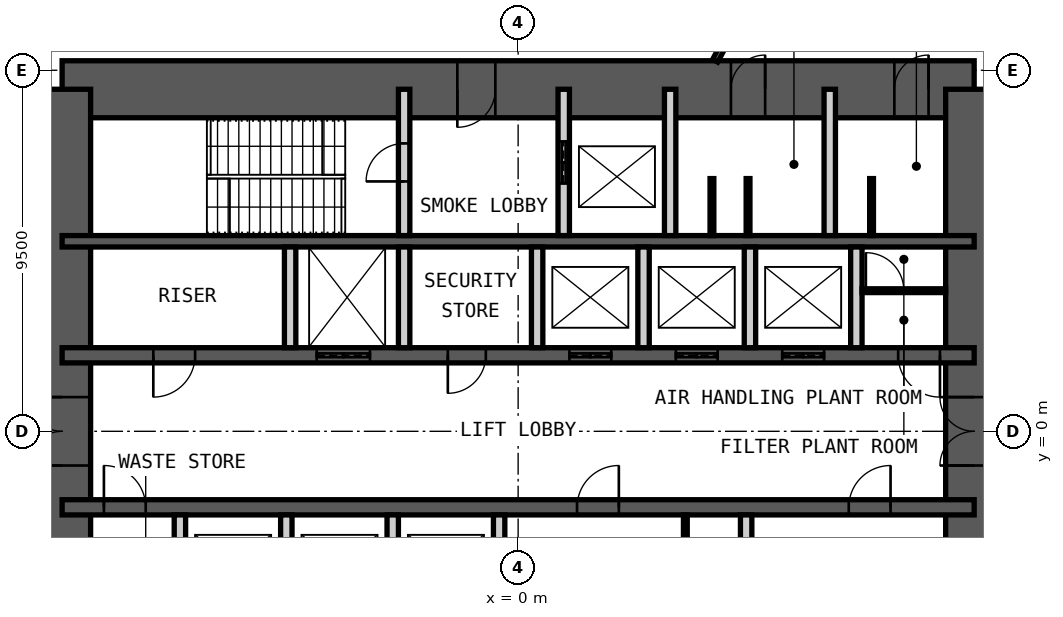
"""IFC4 building model, lengths in metres.
Left out: names, types, materials, properties, quantities, classifications, styles, units other than length and angle.
Written with IfcOpenShell. Run it as: python <this file> out.ifc"""

import sys

from ifc_helpers import new_model, si_unit, direction, frame, frame_2d, origin, place, context, subcontext, project, spatial, rectangle, extrude, element, fill, save


model = new_model("IFC4")
c1 = context("Model", 3, precision=1e-05, world=origin(), true_north=direction((0.0, 1.0)))
c2 = subcontext(c1, "Body", "Model", "MODEL_VIEW")
j1 = project(units=[si_unit("LENGTHUNIT", "METRE"), si_unit("PLANEANGLEUNIT", "RADIAN")], contexts=[c1])
p1 = place(None, origin())
s1 = spatial("IfcSite", under=j1, at=p1, CompositionType="ELEMENT")
p2 = place(p1, origin())
s2 = spatial("IfcBuilding", under=s1, at=p2, CompositionType="ELEMENT")
p3 = place(p2, frame((0.0, 0.0, 12.0)))
s3 = spatial("IfcBuildingStorey", under=s2, at=p3, CompositionType="ELEMENT", Elevation=12.0)
p4 = place(p3, frame((-12.0, 9.0, 0.0), z_axis=(0.0, 0.0, 1.0), x_axis=(1.0, 0.0, 0.0)))
e1 = element("IfcWall", 1, at=p4, inside=s3, PredefinedType="SHEAR", context=c2, shape_type="SweptSolid", body=[
    extrude(rectangle(XDim=24.0, YDim=1.5, at=frame_2d((12.0, 0.0))), origin(), (0.0, 0.0, 1.0), 5.0),
])
p5 = place(p4, frame((10.4, 0.0, 0.0)))
e2 = element("IfcOpeningElement", 2, at=p5, cuts=e1, PredefinedType="OPENING", context=c2, shape_type="SweptSolid", body=[
    extrude(rectangle(XDim=1.0, YDim=2.1, at=frame_2d((0.5, 1.05))), frame((0.0, 0.76, 0.0), z_axis=(0.0, -1.0, 0.0), x_axis=(1.0, 0.0, 0.0)), (0.0, 0.0, 1.0), 1.52),
])
p6 = place(p4, frame((17.6, 0.0, 0.0)))
e3 = element("IfcOpeningElement", 3, at=p6, cuts=e1, PredefinedType="OPENING", context=c2, shape_type="SweptSolid", body=[
    extrude(rectangle(XDim=0.9, YDim=2.1, at=frame_2d((0.45, 1.05))), frame((0.0, 0.76, 0.0), z_axis=(0.0, -1.0, 0.0), x_axis=(1.0, 0.0, 0.0)), (0.0, 0.0, 1.0), 1.52),
])
p7 = place(p4, frame((21.9, 0.0, 0.0)))
e4 = element("IfcOpeningElement", 4, at=p7, cuts=e1, PredefinedType="OPENING", context=c2, shape_type="SweptSolid", body=[
    extrude(rectangle(XDim=0.9, YDim=2.1, at=frame_2d((0.45, 1.05))), frame((0.0, 0.76, 0.0), z_axis=(0.0, -1.0, 0.0), x_axis=(1.0, 0.0, 0.0)), (0.0, 0.0, 1.0), 1.52),
])
p8 = place(p3, frame((12.0, -9.0, 0.0), z_axis=(0.0, 0.0, 1.0), x_axis=(0.0, 1.0, 0.0)))
e5 = element("IfcWall", 5, at=p8, inside=s3, PredefinedType="SHEAR", context=c2, shape_type="SweptSolid", body=[
    extrude(rectangle(XDim=18.0, YDim=1.5, at=frame_2d((9.0, 0.0))), origin(), (0.0, 0.0, 1.0), 5.0),
])
p9 = place(p8, frame((8.1, 0.0, 0.0)))
e6 = element("IfcOpeningElement", 6, at=p9, cuts=e5, PredefinedType="OPENING", context=c2, shape_type="SweptSolid", body=[
    extrude(rectangle(XDim=1.8, YDim=2.1, at=frame_2d((0.9, 1.05))), frame((0.0, 0.76, 0.0), z_axis=(0.0, -1.0, 0.0), x_axis=(1.0, 0.0, 0.0)), (0.0, 0.0, 1.0), 1.52),
])
p10 = place(p3, frame((-12.0, -9.0, 0.0), z_axis=(0.0, 0.0, 1.0), x_axis=(0.0, 1.0, 0.0)))
e7 = element("IfcWall", 7, at=p10, inside=s3, PredefinedType="SHEAR", context=c2, shape_type="SweptSolid", body=[
    extrude(rectangle(XDim=18.0, YDim=1.5, at=frame_2d((9.0, 0.0))), origin(), (0.0, 0.0, 1.0), 5.0),
])
p11 = place(p10, frame((8.1, 0.0, 0.0)))
e8 = element("IfcOpeningElement", 8, at=p11, cuts=e7, PredefinedType="OPENING", context=c2, shape_type="SweptSolid", body=[
    extrude(rectangle(XDim=1.8, YDim=2.1, at=frame_2d((0.9, 1.05))), frame((0.0, 0.76, 0.0), z_axis=(0.0, -1.0, 0.0), x_axis=(1.0, 0.0, 0.0)), (0.0, 0.0, 1.0), 1.52),
])
p12 = place(p3, frame((-12.0, 5.0, 0.0), z_axis=(0.0, 0.0, 1.0), x_axis=(1.0, 0.0, 0.0)))
e9 = element("IfcWall", 9, at=p12, inside=s3, PredefinedType="SHEAR", context=c2, shape_type="SweptSolid", body=[
    extrude(rectangle(XDim=24.0, YDim=0.3, at=frame_2d((12.0, 0.0))), origin(), (0.0, 0.0, 1.0), 5.0),
])
p13 = place(p3, frame((-12.0, 2.0, 0.0), z_axis=(0.0, 0.0, 1.0), x_axis=(1.0, 0.0, 0.0)))
e10 = element("IfcWall", 10, at=p13, inside=s3, PredefinedType="SHEAR", context=c2, shape_type="SweptSolid", body=[
    extrude(rectangle(XDim=24.0, YDim=0.4, at=frame_2d((12.0, 0.0))), origin(), (0.0, 0.0, 1.0), 5.0),
])
p14 = place(p13, frame((2.4, 0.0, 0.0)))
e11 = element("IfcOpeningElement", 11, at=p14, cuts=e10, PredefinedType="OPENING", context=c2, shape_type="SweptSolid", body=[
    extrude(rectangle(XDim=1.1, YDim=2.1, at=frame_2d((0.55, 1.05))), frame((0.0, 0.21, 0.0), z_axis=(0.0, -1.0, 0.0), x_axis=(1.0, 0.0, 0.0)), (0.0, 0.0, 1.0), 0.42),
])
p15 = place(p13, frame((22.0, 0.0, 0.0)))
e12 = element("IfcOpeningElement", 12, at=p15, cuts=e10, PredefinedType="OPENING", context=c2, shape_type="SweptSolid", body=[
    extrude(rectangle(XDim=1.1, YDim=2.1, at=frame_2d((0.55, 1.05))), frame((0.0, 0.21, 0.0), z_axis=(0.0, -1.0, 0.0), x_axis=(1.0, 0.0, 0.0)), (0.0, 0.0, 1.0), 0.42),
])
p16 = place(p13, frame((10.15, 0.0, 0.0)))
e13 = element("IfcOpeningElement", 13, at=p16, cuts=e10, PredefinedType="OPENING", context=c2, shape_type="SweptSolid", body=[
    extrude(rectangle(XDim=1.0, YDim=2.1, at=frame_2d((0.5, 1.05))), frame((0.0, 0.21, 0.0), z_axis=(0.0, -1.0, 0.0), x_axis=(1.0, 0.0, 0.0)), (0.0, 0.0, 1.0), 0.42),
])
p17 = place(p13, frame((6.7, 0.0, 0.0)))
e14 = element("IfcOpeningElement", 14, at=p17, cuts=e10, PredefinedType="OPENING", context=c2, shape_type="SweptSolid", body=[
    extrude(rectangle(XDim=1.4, YDim=2.4, at=frame_2d((0.7, 1.2))), frame((0.0, 0.21, 0.0), z_axis=(0.0, -1.0, 0.0), x_axis=(1.0, 0.0, 0.0)), (0.0, 0.0, 1.0), 0.42),
])
p18 = place(p13, frame((13.35, 0.0, 0.0)))
e15 = element("IfcOpeningElement", 15, at=p18, cuts=e10, PredefinedType="OPENING", context=c2, shape_type="SweptSolid", body=[
    extrude(rectangle(XDim=1.1, YDim=2.4, at=frame_2d((0.55, 1.2))), frame((0.0, 0.21, 0.0), z_axis=(0.0, -1.0, 0.0), x_axis=(1.0, 0.0, 0.0)), (0.0, 0.0, 1.0), 0.42),
])
p19 = place(p13, frame((16.15, 0.0, 0.0)))
e16 = element("IfcOpeningElement", 16, at=p19, cuts=e10, PredefinedType="OPENING", context=c2, shape_type="SweptSolid", body=[
    extrude(rectangle(XDim=1.1, YDim=2.4, at=frame_2d((0.55, 1.2))), frame((0.0, 0.21, 0.0), z_axis=(0.0, -1.0, 0.0), x_axis=(1.0, 0.0, 0.0)), (0.0, 0.0, 1.0), 0.42),
])
p20 = place(p13, frame((18.95, 0.0, 0.0)))
e17 = element("IfcOpeningElement", 17, at=p20, cuts=e10, PredefinedType="OPENING", context=c2, shape_type="SweptSolid", body=[
    extrude(rectangle(XDim=1.1, YDim=2.4, at=frame_2d((0.55, 1.2))), frame((0.0, 0.21, 0.0), z_axis=(0.0, -1.0, 0.0), x_axis=(1.0, 0.0, 0.0)), (0.0, 0.0, 1.0), 0.42),
])
p21 = place(p3, frame((-12.0, -2.0, 0.0), z_axis=(0.0, 0.0, 1.0), x_axis=(1.0, 0.0, 0.0)))
e18 = element("IfcWall", 18, at=p21, inside=s3, PredefinedType="SHEAR", context=c2, shape_type="SweptSolid", body=[
    extrude(rectangle(XDim=24.0, YDim=0.4, at=frame_2d((12.0, 0.0))), origin(), (0.0, 0.0, 1.0), 5.0),
])
p22 = place(p21, frame((1.1, 0.0, 0.0)))
e19 = element("IfcOpeningElement", 19, at=p22, cuts=e18, PredefinedType="OPENING", context=c2, shape_type="SweptSolid", body=[
    extrude(rectangle(XDim=1.1, YDim=2.1, at=frame_2d((0.55, 1.05))), frame((0.0, 0.21, 0.0), z_axis=(0.0, -1.0, 0.0), x_axis=(1.0, 0.0, 0.0)), (0.0, 0.0, 1.0), 0.42),
])
p23 = place(p21, frame((13.55, 0.0, 0.0)))
e20 = element("IfcOpeningElement", 20, at=p23, cuts=e18, PredefinedType="OPENING", context=c2, shape_type="SweptSolid", body=[
    extrude(rectangle(XDim=1.1, YDim=2.1, at=frame_2d((0.55, 1.05))), frame((0.0, 0.21, 0.0), z_axis=(0.0, -1.0, 0.0), x_axis=(1.0, 0.0, 0.0)), (0.0, 0.0, 1.0), 0.42),
])
p24 = place(p21, frame((20.7, 0.0, 0.0)))
e21 = element("IfcOpeningElement", 21, at=p24, cuts=e18, PredefinedType="OPENING", context=c2, shape_type="SweptSolid", body=[
    extrude(rectangle(XDim=1.1, YDim=2.1, at=frame_2d((0.55, 1.05))), frame((0.0, 0.21, 0.0), z_axis=(0.0, -1.0, 0.0), x_axis=(1.0, 0.0, 0.0)), (0.0, 0.0, 1.0), 0.42),
])
p25 = place(p3, frame((-3.0, 5.15, 0.0), z_axis=(0.0, 0.0, 1.0), x_axis=(0.0, 1.0, 0.0)))
e22 = element("IfcWall", 22, at=p25, inside=s3, PredefinedType="PARTITIONING", context=c2, shape_type="SweptSolid", body=[
    extrude(rectangle(XDim=3.85, YDim=0.3, at=frame_2d((1.925, 0.0))), origin(), (0.0, 0.0, 1.0), 4.78),
])
p26 = place(p25, frame((1.425, 0.0, 0.0)))
e23 = element("IfcOpeningElement", 23, at=p26, cuts=e22, PredefinedType="OPENING", context=c2, shape_type="SweptSolid", body=[
    extrude(rectangle(XDim=1.0, YDim=2.1, at=frame_2d((0.5, 1.05))), frame((0.0, 0.16, 0.0), z_axis=(0.0, -1.0, 0.0), x_axis=(1.0, 0.0, 0.0)), (0.0, 0.0, 1.0), 0.32),
])
p27 = place(p3, frame((1.2, 5.15, 0.0), z_axis=(0.0, 0.0, 1.0), x_axis=(0.0, 1.0, 0.0)))
e24 = element("IfcWall", 24, at=p27, inside=s3, PredefinedType="PARTITIONING", context=c2, shape_type="SweptSolid", body=[
    extrude(rectangle(XDim=3.85, YDim=0.3, at=frame_2d((1.925, 0.0))), origin(), (0.0, 0.0, 1.0), 4.78),
])
p28 = place(p27, frame((1.375, 0.0, 0.0)))
e25 = element("IfcOpeningElement", 25, at=p28, cuts=e24, PredefinedType="OPENING", context=c2, shape_type="SweptSolid", body=[
    extrude(rectangle(XDim=1.1, YDim=2.4, at=frame_2d((0.55, 1.2))), frame((0.0, 0.16, 0.0), z_axis=(0.0, -1.0, 0.0), x_axis=(1.0, 0.0, 0.0)), (0.0, 0.0, 1.0), 0.32),
])
for number, where, z_axis, x_axis in (
    (26, (4.0, 5.15, 0.0), (0.0, 0.0, 1.0), (0.0, 1.0, 0.0)),
    (27, (8.2, 5.15, 0.0), (0.0, 0.0, 1.0), (0.0, 1.0, 0.0)),
):
    element("IfcWall", number, at=place(p3, frame(where, z_axis=z_axis, x_axis=x_axis)), inside=s3, PredefinedType="PARTITIONING", context=c2, shape_type="SweptSolid", body=[
        extrude(rectangle(XDim=3.85, YDim=0.3, at=frame_2d((1.925, 0.0))), origin(), (0.0, 0.0, 1.0), 4.78),
    ])
for number, where, z_axis, x_axis in (
    (28, (-6.0, 2.2, 0.0), (0.0, 0.0, 1.0), (0.0, 1.0, 0.0)),
    (29, (-3.0, 2.2, 0.0), (0.0, 0.0, 1.0), (0.0, 1.0, 0.0)),
    (30, (0.5, 2.2, 0.0), (0.0, 0.0, 1.0), (0.0, 1.0, 0.0)),
    (31, (3.3, 2.2, 0.0), (0.0, 0.0, 1.0), (0.0, 1.0, 0.0)),
    (32, (6.1, 2.2, 0.0), (0.0, 0.0, 1.0), (0.0, 1.0, 0.0)),
    (33, (8.9, 2.2, 0.0), (0.0, 0.0, 1.0), (0.0, 1.0, 0.0)),
    (34, (-8.9, -4.85, 0.0), (0.0, 0.0, 1.0), (0.0, 1.0, 0.0)),
    (35, (-6.1, -4.85, 0.0), (0.0, 0.0, 1.0), (0.0, 1.0, 0.0)),
    (36, (-3.3, -4.85, 0.0), (0.0, 0.0, 1.0), (0.0, 1.0, 0.0)),
    (37, (-0.5, -4.85, 0.0), (0.0, 0.0, 1.0), (0.0, 1.0, 0.0)),
    (38, (6.0, -4.85, 0.0), (0.0, 0.0, 1.0), (0.0, 1.0, 0.0)),
):
    element("IfcWall", number, at=place(p3, frame(where, z_axis=z_axis, x_axis=x_axis)), inside=s3, PredefinedType="PARTITIONING", context=c2, shape_type="SweptSolid", body=[
        extrude(rectangle(XDim=2.65, YDim=0.3, at=frame_2d((1.325, 0.0))), origin(), (0.0, 0.0, 1.0), 4.78),
    ])
p29 = place(p3, frame((4.4, -4.85, 0.0), z_axis=(0.0, 0.0, 1.0), x_axis=(0.0, 1.0, 0.0)))
e39 = element("IfcWall", 39, at=p29, inside=s3, PredefinedType="PARTITIONING", context=c2, shape_type="SweptSolid", body=[
    extrude(rectangle(XDim=2.65, YDim=0.1, at=frame_2d((1.325, 0.0))), origin(), (0.0, 0.0, 1.0), 4.78),
])
p30 = place(p29, frame((0.1, 0.0, 0.0)))
e40 = element("IfcOpeningElement", 40, at=p30, cuts=e39, PredefinedType="OPENING", context=c2, shape_type="SweptSolid", body=[
    extrude(rectangle(XDim=1.0, YDim=2.4, at=frame_2d((0.5, 1.2))), frame((0.0, 0.06, 0.0), z_axis=(0.0, -1.0, 0.0), x_axis=(1.0, 0.0, 0.0)), (0.0, 0.0, 1.0), 0.12),
])
p31 = place(p3, frame((9.05, 3.7, 0.0), z_axis=(0.0, 0.0, 1.0), x_axis=(1.0, 0.0, 0.0)))
e41 = element("IfcWall", 41, at=p31, inside=s3, PredefinedType="PARTITIONING", context=c2, shape_type="SweptSolid", body=[
    extrude(rectangle(XDim=2.2, YDim=0.1, at=frame_2d((1.1, 0.0))), origin(), (0.0, 0.0, 1.0), 4.78),
])
p32 = place(p31, frame((0.1, 0.0, 0.0)))
e42 = element("IfcOpeningElement", 42, at=p32, cuts=e41, PredefinedType="OPENING", context=c2, shape_type="SweptSolid", body=[
    extrude(rectangle(XDim=1.0, YDim=2.4, at=frame_2d((0.5, 1.2))), frame((0.0, 0.06, 0.0), z_axis=(0.0, -1.0, 0.0), x_axis=(1.0, 0.0, 0.0)), (0.0, 0.0, 1.0), 0.12),
])
for number, where, z_axis, x_axis in (
    (43, (5.1, 5.15, 0.0), (0.0, 0.0, 1.0), (0.0, 1.0, 0.0)),
    (44, (6.05, 5.15, 0.0), (0.0, 0.0, 1.0), (0.0, 1.0, 0.0)),
    (45, (9.3, 5.15, 0.0), (0.0, 0.0, 1.0), (0.0, 1.0, 0.0)),
):
    element("IfcWall", number, at=place(p3, frame(where, z_axis=z_axis, x_axis=x_axis)), inside=s3, PredefinedType="PARTITIONING", context=c2, shape_type="SweptSolid", body=[
        extrude(rectangle(XDim=1.5, YDim=0.1, at=frame_2d((0.75, 0.0))), origin(), (0.0, 0.0, 1.0), 2.1),
    ])
p33 = place(p3, frame((5.184, 9.75, 0.0), z_axis=(0.0, 0.0, 1.0), x_axis=(0.469474147629, 0.882946218469, 0.0)))
e46 = element("IfcWall", 46, at=p33, inside=s3, PredefinedType="PARTITIONING", context=c2, shape_type="SweptSolid", body=[
    extrude(rectangle(XDim=24.588, YDim=0.15, at=frame_2d((12.294, 0.0))), origin(), (0.0, 0.0, 1.0), 4.7),
])
p34 = place(p33, frame((11.394, 0.0, 0.0)))
e47 = element("IfcOpeningElement", 47, at=p34, cuts=e46, PredefinedType="OPENING", context=c2, shape_type="SweptSolid", body=[
    extrude(rectangle(XDim=1.8, YDim=2.4, at=frame_2d((0.9, 1.2))), frame((0.0, 0.085, 0.0), z_axis=(0.0, -1.0, 0.0), x_axis=(1.0, 0.0, 0.0)), (0.0, 0.0, 1.0), 0.17),
])
p35 = place(p5, origin())
e48 = element("IfcDoor", 48, at=p35, inside=s3, OperationType="SINGLE_SWING_LEFT", PredefinedType="DOOR", context=c2, shape_type="SweptSolid", body=[
    extrude(rectangle(XDim=1.0, YDim=2.1, at=frame_2d((0.5, 1.05))), frame((0.0, 0.025, 0.0), z_axis=(0.0, -1.0, 0.0), x_axis=(1.0, 0.0, 0.0)), (0.0, 0.0, 1.0), 0.05),
])
fill(e2, e48)
p36 = place(p6, origin())
e49 = element("IfcDoor", 49, at=p36, inside=s3, OperationType="SINGLE_SWING_LEFT", PredefinedType="DOOR", context=c2, shape_type="SweptSolid", body=[
    extrude(rectangle(XDim=0.9, YDim=2.1, at=frame_2d((0.45, 1.05))), frame((0.0, 0.025, 0.0), z_axis=(0.0, -1.0, 0.0), x_axis=(1.0, 0.0, 0.0)), (0.0, 0.0, 1.0), 0.05),
])
fill(e3, e49)
p37 = place(p7, origin())
e50 = element("IfcDoor", 50, at=p37, inside=s3, OperationType="SINGLE_SWING_LEFT", PredefinedType="DOOR", context=c2, shape_type="SweptSolid", body=[
    extrude(rectangle(XDim=0.9, YDim=2.1, at=frame_2d((0.45, 1.05))), frame((0.0, 0.025, 0.0), z_axis=(0.0, -1.0, 0.0), x_axis=(1.0, 0.0, 0.0)), (0.0, 0.0, 1.0), 0.05),
])
fill(e4, e50)
p38 = place(p26, origin())
e51 = element("IfcDoor", 51, at=p38, inside=s3, OperationType="SINGLE_SWING_RIGHT", PredefinedType="DOOR", context=c2, shape_type="SweptSolid", body=[
    extrude(rectangle(XDim=1.0, YDim=2.1, at=frame_2d((0.5, 1.05))), frame((0.0, 0.025, 0.0), z_axis=(0.0, -1.0, 0.0), x_axis=(1.0, 0.0, 0.0)), (0.0, 0.0, 1.0), 0.05),
])
fill(e23, e51)
p39 = place(p14, origin())
e52 = element("IfcDoor", 52, at=p39, inside=s3, OperationType="SINGLE_SWING_LEFT", PredefinedType="DOOR", context=c2, shape_type="SweptSolid", body=[
    extrude(rectangle(XDim=1.1, YDim=2.1, at=frame_2d((0.55, 1.05))), frame((0.0, 0.025, 0.0), z_axis=(0.0, -1.0, 0.0), x_axis=(1.0, 0.0, 0.0)), (0.0, 0.0, 1.0), 0.05),
])
fill(e11, e52)
p40 = place(p22, origin())
e53 = element("IfcDoor", 53, at=p40, inside=s3, OperationType="SINGLE_SWING_RIGHT", PredefinedType="DOOR", context=c2, shape_type="SweptSolid", body=[
    extrude(rectangle(XDim=1.1, YDim=2.1, at=frame_2d((0.55, 1.05))), frame((0.0, 0.025, 0.0), z_axis=(0.0, -1.0, 0.0), x_axis=(1.0, 0.0, 0.0)), (0.0, 0.0, 1.0), 0.05),
])
fill(e19, e53)
p41 = place(p15, origin())
e54 = element("IfcDoor", 54, at=p41, inside=s3, OperationType="SINGLE_SWING_RIGHT", PredefinedType="DOOR", context=c2, shape_type="SweptSolid", body=[
    extrude(rectangle(XDim=1.1, YDim=2.1, at=frame_2d((0.55, 1.05))), frame((0.0, 0.025, 0.0), z_axis=(0.0, -1.0, 0.0), x_axis=(1.0, 0.0, 0.0)), (0.0, 0.0, 1.0), 0.05),
])
fill(e12, e54)
p42 = place(p16, origin())
e55 = element("IfcDoor", 55, at=p42, inside=s3, OperationType="SINGLE_SWING_LEFT", PredefinedType="DOOR", context=c2, shape_type="SweptSolid", body=[
    extrude(rectangle(XDim=1.0, YDim=2.1, at=frame_2d((0.5, 1.05))), frame((0.0, 0.025, 0.0), z_axis=(0.0, -1.0, 0.0), x_axis=(1.0, 0.0, 0.0)), (0.0, 0.0, 1.0), 0.05),
])
fill(e13, e55)
p43 = place(p23, origin())
e56 = element("IfcDoor", 56, at=p43, inside=s3, OperationType="SINGLE_SWING_LEFT", PredefinedType="DOOR", context=c2, shape_type="SweptSolid", body=[
    extrude(rectangle(XDim=1.1, YDim=2.1, at=frame_2d((0.55, 1.05))), frame((0.0, 0.025, 0.0), z_axis=(0.0, -1.0, 0.0), x_axis=(1.0, 0.0, 0.0)), (0.0, 0.0, 1.0), 0.05),
])
fill(e20, e56)
p44 = place(p24, origin())
e57 = element("IfcDoor", 57, at=p44, inside=s3, OperationType="SINGLE_SWING_LEFT", PredefinedType="DOOR", context=c2, shape_type="SweptSolid", body=[
    extrude(rectangle(XDim=1.1, YDim=2.1, at=frame_2d((0.55, 1.05))), frame((0.0, 0.025, 0.0), z_axis=(0.0, -1.0, 0.0), x_axis=(1.0, 0.0, 0.0)), (0.0, 0.0, 1.0), 0.05),
])
fill(e21, e57)
p45 = place(p9, origin())
e58 = element("IfcDoor", 58, at=p45, inside=s3, OperationType="DOUBLE_DOOR_DOUBLE_SWING", PredefinedType="DOOR", context=c2, shape_type="SweptSolid", body=[
    extrude(rectangle(XDim=1.8, YDim=2.1, at=frame_2d((0.9, 1.05))), frame((0.0, 0.025, 0.0), z_axis=(0.0, -1.0, 0.0), x_axis=(1.0, 0.0, 0.0)), (0.0, 0.0, 1.0), 0.05),
])
fill(e6, e58)
p46 = place(p11, origin())
e59 = element("IfcDoor", 59, at=p46, inside=s3, OperationType="DOUBLE_DOOR_DOUBLE_SWING", PredefinedType="DOOR", context=c2, shape_type="SweptSolid", body=[
    extrude(rectangle(XDim=1.8, YDim=2.1, at=frame_2d((0.9, 1.05))), frame((0.0, 0.025, 0.0), z_axis=(0.0, -1.0, 0.0), x_axis=(1.0, 0.0, 0.0)), (0.0, 0.0, 1.0), 0.05),
])
fill(e8, e59)
p47 = place(p28, origin())
e60 = element("IfcDoor", 60, at=p47, inside=s3, OperationType="DOUBLE_DOOR_SLIDING", PredefinedType="DOOR", context=c2, shape_type="SweptSolid", body=[
    extrude(rectangle(XDim=1.1, YDim=2.4, at=frame_2d((0.55, 1.2))), frame((0.0, 0.025, 0.0), z_axis=(0.0, -1.0, 0.0), x_axis=(1.0, 0.0, 0.0)), (0.0, 0.0, 1.0), 0.05),
])
fill(e25, e60)
p48 = place(p17, origin())
e61 = element("IfcDoor", 61, at=p48, inside=s3, OperationType="DOUBLE_DOOR_SLIDING", PredefinedType="DOOR", context=c2, shape_type="SweptSolid", body=[
    extrude(rectangle(XDim=1.4, YDim=2.4, at=frame_2d((0.7, 1.2))), frame((0.0, 0.025, 0.0), z_axis=(0.0, -1.0, 0.0), x_axis=(1.0, 0.0, 0.0)), (0.0, 0.0, 1.0), 0.05),
])
fill(e14, e61)
p49 = place(p18, origin())
e62 = element("IfcDoor", 62, at=p49, inside=s3, OperationType="DOUBLE_DOOR_SLIDING", PredefinedType="DOOR", context=c2, shape_type="SweptSolid", body=[
    extrude(rectangle(XDim=1.1, YDim=2.4, at=frame_2d((0.55, 1.2))), frame((0.0, 0.025, 0.0), z_axis=(0.0, -1.0, 0.0), x_axis=(1.0, 0.0, 0.0)), (0.0, 0.0, 1.0), 0.05),
])
fill(e15, e62)
p50 = place(p19, origin())
e63 = element("IfcDoor", 63, at=p50, inside=s3, OperationType="DOUBLE_DOOR_SLIDING", PredefinedType="DOOR", context=c2, shape_type="SweptSolid", body=[
    extrude(rectangle(XDim=1.1, YDim=2.4, at=frame_2d((0.55, 1.2))), frame((0.0, 0.025, 0.0), z_axis=(0.0, -1.0, 0.0), x_axis=(1.0, 0.0, 0.0)), (0.0, 0.0, 1.0), 0.05),
])
fill(e16, e63)
p51 = place(p20, origin())
e64 = element("IfcDoor", 64, at=p51, inside=s3, OperationType="DOUBLE_DOOR_SLIDING", PredefinedType="DOOR", context=c2, shape_type="SweptSolid", body=[
    extrude(rectangle(XDim=1.1, YDim=2.4, at=frame_2d((0.55, 1.2))), frame((0.0, 0.025, 0.0), z_axis=(0.0, -1.0, 0.0), x_axis=(1.0, 0.0, 0.0)), (0.0, 0.0, 1.0), 0.05),
])
fill(e17, e64)
p52 = place(p32, origin())
e65 = element("IfcDoor", 65, at=p52, inside=s3, OperationType="SINGLE_SWING_RIGHT", PredefinedType="DOOR", context=c2, shape_type="SweptSolid", body=[
    extrude(rectangle(XDim=1.0, YDim=2.4, at=frame_2d((0.5, 1.2))), frame((0.0, 0.025, 0.0), z_axis=(0.0, -1.0, 0.0), x_axis=(1.0, 0.0, 0.0)), (0.0, 0.0, 1.0), 0.05),
])
fill(e42, e65)
save(model, sys.argv[1])
